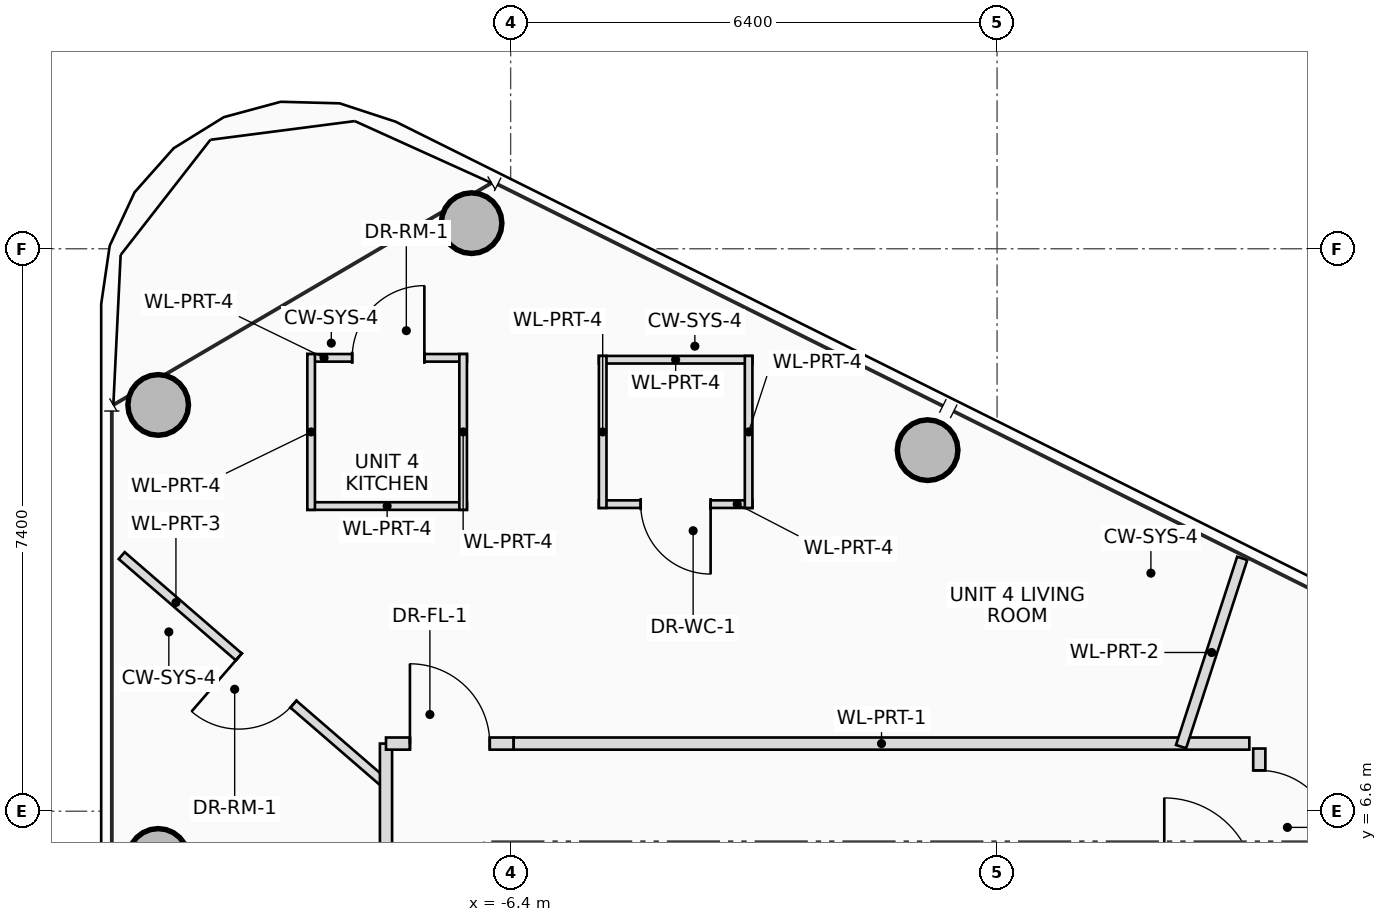
"""IFC4 building model, lengths in metres.
Left out: names, types, materials, properties, quantities, classifications, styles, units other than length and angle.
Written with IfcOpenShell. Run it as: python <this file> out.ifc"""

import sys

from ifc_helpers import new_model, si_unit, direction, frame, frame_2d, origin, origin_2d, place, context, subcontext, project, spatial, rectangle, hollow_circle, extrude, source, transform, mapped, element, fill, save


model = new_model("IFC4")
c1 = context("Model", 3, precision=1e-05, world=origin(), true_north=direction((0.0, 1.0)))
c2 = subcontext(c1, "Body", "Model", "MODEL_VIEW")
j1 = project(units=[si_unit("LENGTHUNIT", "METRE"), si_unit("PLANEANGLEUNIT", "RADIAN")], contexts=[c1])
p1 = place(None, origin())
s1 = spatial("IfcSite", under=j1, at=p1, CompositionType="ELEMENT")
p2 = place(p1, origin())
s2 = spatial("IfcBuilding", under=s1, at=p2, CompositionType="ELEMENT")
p3 = place(p2, frame((0.0, 0.0, 303.65)))
s3 = spatial("IfcBuildingStorey", under=s2, at=p3, CompositionType="ELEMENT", Elevation=303.65)
m1 = source(origin(), c2, "Body", "SweptSolid", [
    extrude(hollow_circle(Radius=0.4, WallThickness=0.028, at=origin_2d()), origin(), (0.0, 0.0, 1.0), 3.45),
])
for number, where, z_axis, x_axis in (
    (1, (-0.914, 11.35, 0.0), (0.0, 0.0, 1.0), (1.0, 0.0, 0.0)),
    (2, (-6.914, 14.337, 0.0), (0.0, 0.0, 1.0), (1.0, 0.0, 0.0)),
    (3, (-11.037, 11.945, 0.0), (0.0, 0.0, 1.0), (1.0, 0.0, 0.0)),
    (4, (-11.037, 5.973, 0.0), (0.0, 0.0, 1.0), (1.0, 0.0, 0.0)),
):
    element("IfcColumn", number, at=place(p3, frame(where, z_axis=z_axis, x_axis=x_axis)), inside=s3, PredefinedType="COLUMN", context=c2, shape_type="MappedRepresentation", body=[
        mapped(m1, transform((0.0, 0.0, 0.0), scale=1.0)),
    ])
p4 = place(p3, frame((-8.07, 6.981, 0.0), z_axis=(0.0, 0.0, 1.0), x_axis=(-0.756280799409, 0.654247164644, 0.0)))
e5 = element("IfcWall", 5, at=p4, inside=s3, PredefinedType="PARTITIONING", context=c2, shape_type="SweptSolid", body=[
    extrude(rectangle(XDim=4.558, YDim=0.12, at=frame_2d((2.279, 0.0))), origin(), (0.0, 0.0, 1.0), 2.815),
])
p5 = place(p4, frame((1.571, 0.0, 0.0)))
e6 = element("IfcOpeningElement", 6, at=p5, cuts=e5, PredefinedType="OPENING", context=c2, shape_type="SweptSolid", body=[
    extrude(rectangle(XDim=0.95, YDim=2.1, at=frame_2d((0.475, 1.05))), frame((0.0, 0.07, 0.0), z_axis=(0.0, -1.0, 0.0), x_axis=(1.0, 0.0, 0.0)), (0.0, 0.0, 1.0), 0.14),
])
p6 = place(p3, frame((-5.239, 12.54, 0.0), z_axis=(0.0, 0.0, 1.0), x_axis=(1.0, 0.0, 0.0)))
e7 = element("IfcWall", 7, at=p6, inside=s3, PredefinedType="PARTITIONING", context=c2, shape_type="SweptSolid", body=[
    extrude(rectangle(XDim=2.02, YDim=0.1, at=frame_2d((1.01, 0.0))), origin(), (0.0, 0.0, 1.0), 2.815),
])
p7 = place(p3, frame((-3.219, 10.64, 0.0), z_axis=(0.0, 0.0, 1.0), x_axis=(-1.0, 0.0, 0.0)))
e8 = element("IfcWall", 8, at=p7, inside=s3, PredefinedType="PARTITIONING", context=c2, shape_type="SweptSolid", body=[
    extrude(rectangle(XDim=2.02, YDim=0.1, at=frame_2d((1.01, 0.0))), origin(), (0.0, 0.0, 1.0), 2.905),
])
p8 = place(p7, frame((0.55, 0.0, 0.0)))
e9 = element("IfcOpeningElement", 9, at=p8, cuts=e8, PredefinedType="OPENING", context=c2, shape_type="SweptSolid", body=[
    extrude(rectangle(XDim=0.92, YDim=2.1, at=frame_2d((0.46, 1.05))), frame((0.0, 0.06, 0.0), z_axis=(0.0, -1.0, 0.0), x_axis=(1.0, 0.0, 0.0)), (0.0, 0.0, 1.0), 0.12),
])
p9 = place(p3, frame((-3.269, 12.59, 0.0), z_axis=(0.0, 0.0, 1.0), x_axis=(0.0, -1.0, 0.0)))
e10 = element("IfcWall", 10, at=p9, inside=s3, PredefinedType="PARTITIONING", context=c2, shape_type="SweptSolid", body=[
    extrude(rectangle(XDim=2.0, YDim=0.1, at=frame_2d((1.0, 0.0))), origin(), (0.0, 0.0, 1.0), 2.815),
])
p10 = place(p3, frame((-5.189, 10.59, 0.0), z_axis=(0.0, 0.0, 1.0), x_axis=(0.0, 1.0, 0.0)))
e11 = element("IfcWall", 11, at=p10, inside=s3, PredefinedType="PARTITIONING", context=c2, shape_type="SweptSolid", body=[
    extrude(rectangle(XDim=2.0, YDim=0.1, at=frame_2d((1.0, 0.0))), origin(), (0.0, 0.0, 1.0), 2.905),
])
p11 = place(p3, frame((-9.075, 12.565, 0.0), z_axis=(0.0, 0.0, 1.0), x_axis=(1.0, 0.0, 0.0)))
e12 = element("IfcWall", 12, at=p11, inside=s3, PredefinedType="PARTITIONING", context=c2, shape_type="SweptSolid", body=[
    extrude(rectangle(XDim=2.1, YDim=0.1, at=frame_2d((1.05, 0.0))), origin(), (0.0, 0.0, 1.0), 3.25),
])
p12 = place(p11, frame((0.59, 0.0, 0.0)))
e13 = element("IfcOpeningElement", 13, at=p12, cuts=e12, PredefinedType="OPENING", context=c2, shape_type="SweptSolid", body=[
    extrude(rectangle(XDim=0.95, YDim=2.1, at=frame_2d((0.475, 1.05))), frame((0.0, 0.06, 0.0), z_axis=(0.0, -1.0, 0.0), x_axis=(1.0, 0.0, 0.0)), (0.0, 0.0, 1.0), 0.12),
])
p13 = place(p3, frame((-6.975, 10.615, 0.0), z_axis=(0.0, 0.0, 1.0), x_axis=(-1.0, 0.0, 0.0)))
e14 = element("IfcWall", 14, at=p13, inside=s3, PredefinedType="PARTITIONING", context=c2, shape_type="SweptSolid", body=[
    extrude(rectangle(XDim=2.1, YDim=0.1, at=frame_2d((1.05, 0.0))), origin(), (0.0, 0.0, 1.0), 2.905),
])
p14 = place(p3, frame((-7.025, 12.615, 0.0), z_axis=(0.0, 0.0, 1.0), x_axis=(0.0, -1.0, 0.0)))
e15 = element("IfcWall", 15, at=p14, inside=s3, PredefinedType="PARTITIONING", context=c2, shape_type="SweptSolid", body=[
    extrude(rectangle(XDim=2.05, YDim=0.1, at=frame_2d((1.025, 0.0))), origin(), (0.0, 0.0, 1.0), 2.905),
])
p15 = place(p3, frame((-9.025, 10.565, 0.0), z_axis=(0.0, 0.0, 1.0), x_axis=(0.0, 1.0, 0.0)))
e16 = element("IfcWall", 16, at=p15, inside=s3, PredefinedType="PARTITIONING", context=c2, shape_type="SweptSolid", body=[
    extrude(rectangle(XDim=2.05, YDim=0.1, at=frame_2d((1.025, 0.0))), origin(), (0.0, 0.0, 1.0), 3.25),
])
p16 = place(p3, frame((-8.04, 5.85, 0.0), z_axis=(0.0, 0.0, 1.0), x_axis=(0.0, 1.0, 0.0)))
e17 = element("IfcWall", 17, at=p16, inside=s3, PredefinedType="PARTITIONING", context=c2, shape_type="SweptSolid", body=[
    extrude(rectangle(XDim=1.64, YDim=0.16, at=frame_2d((0.82, 0.0))), origin(), (0.0, 0.0, 1.0), 2.905),
])
p17 = place(p3, frame((-8.04, 7.49, 0.0), z_axis=(0.0, 0.0, 1.0), x_axis=(1.0, 0.0, 0.0)))
e18 = element("IfcWall", 18, at=p17, inside=s3, PredefinedType="PARTITIONING", context=c2, shape_type="SweptSolid", body=[
    extrude(rectangle(XDim=1.68, YDim=0.16, at=frame_2d((0.84, 0.0))), origin(), (0.0, 0.0, 1.0), 2.655),
])
p18 = place(p17, frame((0.315, 0.0, 0.0)))
e19 = element("IfcOpeningElement", 19, at=p18, cuts=e18, PredefinedType="OPENING", context=c2, shape_type="SweptSolid", body=[
    extrude(rectangle(XDim=1.05, YDim=2.2, at=frame_2d((0.525, 1.1))), frame((0.0, 0.09, 0.0), z_axis=(0.0, -1.0, 0.0), x_axis=(1.0, 0.0, 0.0)), (0.0, 0.0, 1.0), 0.18),
])
p19 = place(p3, frame((-6.36, 7.49, 0.0), z_axis=(0.0, 0.0, 1.0), x_axis=(1.0, 0.0, 0.0)))
e20 = element("IfcWall", 20, at=p19, inside=s3, PredefinedType="PARTITIONING", context=c2, shape_type="SweptSolid", body=[
    extrude(rectangle(XDim=9.679, YDim=0.16, at=frame_2d((4.84, 0.0))), origin(), (0.0, 0.0, 1.0), 2.655),
])
p20 = place(p3, frame((3.45, 7.425, 0.0), z_axis=(0.0, 0.0, 1.0), x_axis=(0.0, -1.0, 0.0)))
e21 = element("IfcWall", 21, at=p20, inside=s3, PredefinedType="PARTITIONING", context=c2, shape_type="SweptSolid", body=[
    extrude(rectangle(XDim=1.575, YDim=0.16, at=frame_2d((0.787, 0.0))), origin(), (0.0, 0.0, 1.0), 2.855),
])
p21 = place(p20, frame((0.287, 0.0, 0.0)))
e22 = element("IfcOpeningElement", 22, at=p21, cuts=e21, PredefinedType="OPENING", context=c2, shape_type="SweptSolid", body=[
    extrude(rectangle(XDim=1.0, YDim=2.25, at=frame_2d((0.5, 1.125))), frame((0.0, 0.09, 0.0), z_axis=(0.0, -1.0, 0.0), x_axis=(1.0, 0.0, 0.0)), (0.0, 0.0, 1.0), 0.18),
])
p22 = place(p3, frame((2.421, 7.45, 0.0), z_axis=(0.0, 0.0, 1.0), x_axis=(0.309047920595, 0.951046467201, 0.0)))
e23 = element("IfcWall", 23, at=p22, inside=s3, PredefinedType="PARTITIONING", context=c2, shape_type="SweptSolid", body=[
    extrude(rectangle(XDim=2.604, YDim=0.14, at=frame_2d((1.302, 0.0))), origin(), (0.0, 0.0, 1.0), 2.815),
])
p23 = place(p5, origin())
e24 = element("IfcDoor", 24, at=p23, inside=s3, OperationType="SINGLE_SWING_RIGHT", PredefinedType="DOOR", context=c2, shape_type="SweptSolid", body=[
    extrude(rectangle(XDim=0.95, YDim=2.1, at=frame_2d((0.475, 1.05))), frame((0.0, 0.025, 0.0), z_axis=(0.0, -1.0, 0.0), x_axis=(1.0, 0.0, 0.0)), (0.0, 0.0, 1.0), 0.05),
])
fill(e6, e24)
p24 = place(p8, origin())
e25 = element("IfcDoor", 25, at=p24, inside=s3, OperationType="SINGLE_SWING_LEFT", PredefinedType="DOOR", context=c2, shape_type="SweptSolid", body=[
    extrude(rectangle(XDim=0.92, YDim=2.1, at=frame_2d((0.46, 1.05))), frame((0.0, 0.025, 0.0), z_axis=(0.0, -1.0, 0.0), x_axis=(1.0, 0.0, 0.0)), (0.0, 0.0, 1.0), 0.05),
])
fill(e9, e25)
p25 = place(p12, origin())
e26 = element("IfcDoor", 26, at=p25, inside=s3, OperationType="SINGLE_SWING_RIGHT", PredefinedType="DOOR", context=c2, shape_type="SweptSolid", body=[
    extrude(rectangle(XDim=0.95, YDim=2.1, at=frame_2d((0.475, 1.05))), frame((0.0, 0.025, 0.0), z_axis=(0.0, -1.0, 0.0), x_axis=(1.0, 0.0, 0.0)), (0.0, 0.0, 1.0), 0.05),
])
fill(e13, e26)
p26 = place(p18, origin())
e27 = element("IfcDoor", 27, at=p26, inside=s3, OperationType="SINGLE_SWING_LEFT", PredefinedType="DOOR", context=c2, shape_type="SweptSolid", body=[
    extrude(rectangle(XDim=1.05, YDim=2.2, at=frame_2d((0.525, 1.1))), frame((0.0, 0.025, 0.0), z_axis=(0.0, -1.0, 0.0), x_axis=(1.0, 0.0, 0.0)), (0.0, 0.0, 1.0), 0.05),
])
fill(e19, e27)
p27 = place(p21, origin())
e28 = element("IfcDoor", 28, at=p27, inside=s3, OperationType="SINGLE_SWING_RIGHT", PredefinedType="DOOR", context=c2, shape_type="SweptSolid", body=[
    extrude(rectangle(XDim=1.0, YDim=2.25, at=frame_2d((0.5, 1.125))), frame((0.0, 0.025, 0.0), z_axis=(0.0, -1.0, 0.0), x_axis=(1.0, 0.0, 0.0)), (0.0, 0.0, 1.0), 0.05),
])
fill(e22, e28)
save(model, sys.argv[1])
